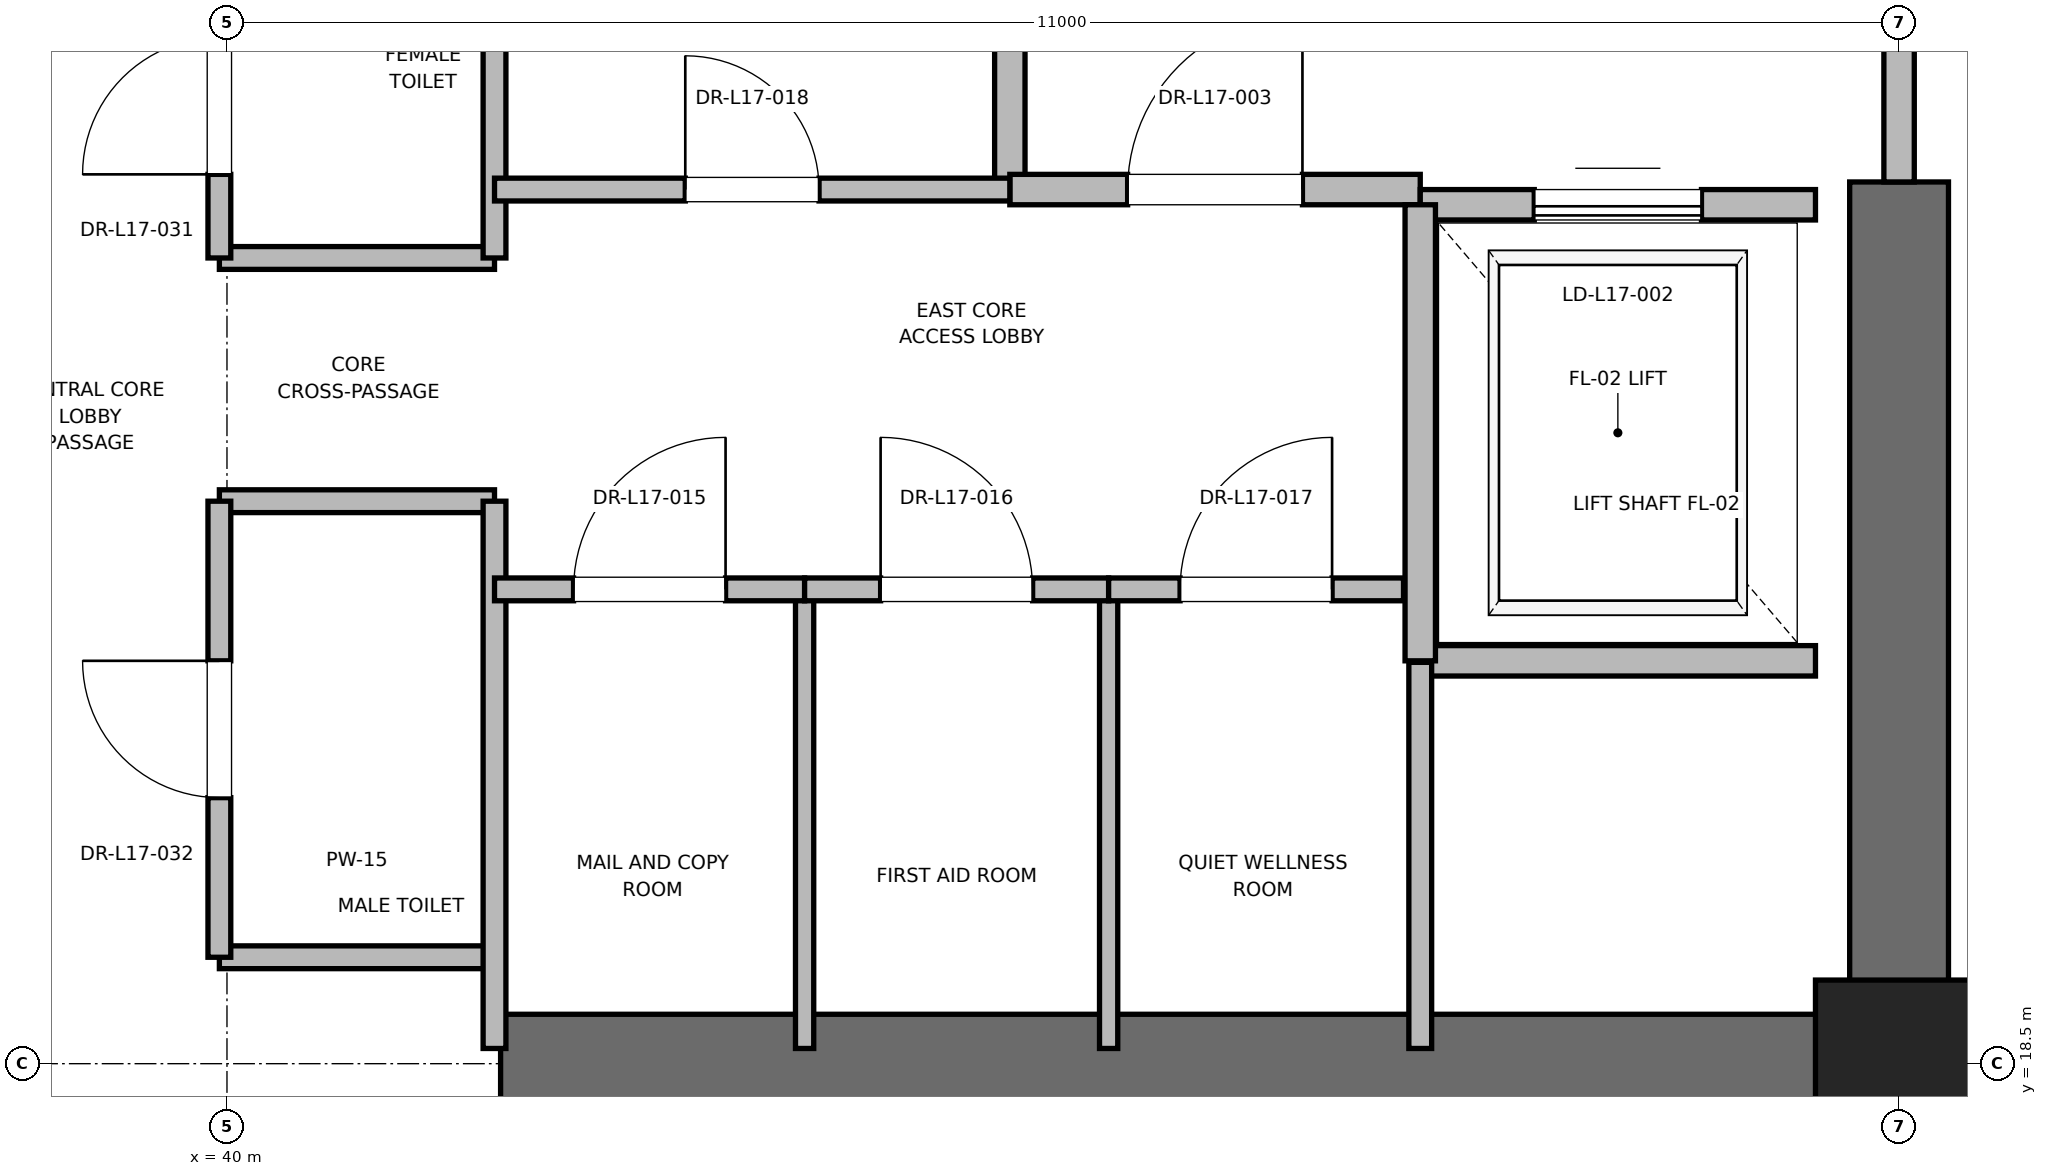
"""IFC4 building model, lengths in metres.
Left out: names, types, materials, properties, quantities, classifications, styles, units other than length and angle.
Written with IfcOpenShell. Run it as: python <this file> out.ifc"""

import sys

from ifc_helpers import new_model, si_unit, direction, frame, frame_2d, origin, origin_2d, place, context, subcontext, project, spatial, rectangle, extrude, element, fill, save


model = new_model("IFC4")
c1 = context("Model", 3, precision=1e-05, world=origin(), true_north=direction((0.0, 1.0)))
c2 = subcontext(c1, "Body", "Model", "MODEL_VIEW")
j1 = project(units=[si_unit("LENGTHUNIT", "METRE"), si_unit("PLANEANGLEUNIT", "RADIAN")], contexts=[c1])
p1 = place(None, origin())
s1 = spatial("IfcSite", under=j1, at=p1, CompositionType="ELEMENT")
p2 = place(p1, origin())
s2 = spatial("IfcBuilding", under=s1, at=p2, CompositionType="ELEMENT")
p3 = place(p2, frame((0.0, 0.0, 75.6)))
s3 = spatial("IfcBuildingStorey", under=s2, at=p3, CompositionType="ELEMENT", Elevation=75.6)
p4 = place(p3, frame((51.0, 18.5, 0.0), z_axis=(0.0, 0.0, 1.0), x_axis=(1.0, 0.0, 0.0)))
e1 = element("IfcColumn", 1, at=p4, inside=s3, PredefinedType="PILASTER", context=c2, shape_type="SweptSolid", body=[
    extrude(rectangle(XDim=1.1, YDim=1.1, at=origin_2d()), origin(), (0.0, 0.0, 1.0), 4.0),
])
p5 = place(p3, frame((41.8, 18.5, 0.0), z_axis=(0.0, 0.0, 1.0), x_axis=(1.0, 0.0, 0.0)))
e2 = element("IfcWall", 2, at=p5, inside=s3, PredefinedType="SHEAR", context=c2, shape_type="SweptSolid", body=[
    extrude(rectangle(XDim=9.2, YDim=0.65, at=frame_2d((4.6, 0.0))), origin(), (0.0, 0.0, 1.0), 3.76),
])
p6 = place(p3, frame((51.0, 18.5, 0.0), z_axis=(0.0, 0.0, 1.0), x_axis=(0.0, 1.0, 0.0)))
e3 = element("IfcWall", 3, at=p6, inside=s3, PredefinedType="SHEAR", context=c2, shape_type="SweptSolid", body=[
    extrude(rectangle(XDim=5.8, YDim=0.65, at=frame_2d((2.9, 0.0))), origin(), (0.0, 0.0, 1.0), 3.76),
])
p7 = place(p3, frame((45.15, 24.25, 0.0), z_axis=(0.0, 0.0, 1.0), x_axis=(0.0, 1.0, 0.0)))
e4 = element("IfcWall", 4, at=p7, inside=s3, PredefinedType="PARTITIONING", context=c2, shape_type="SweptSolid", body=[
    extrude(rectangle(XDim=3.37, YDim=0.2, at=frame_2d((1.685, 0.0))), origin(), (0.0, 0.0, 1.0), 3.76),
])
p8 = place(p3, frame((45.15, 24.25, 0.0), z_axis=(0.0, 0.0, 1.0), x_axis=(1.0, 0.0, 0.0)))
e5 = element("IfcWall", 5, at=p8, inside=s3, PredefinedType="PARTITIONING", context=c2, shape_type="SweptSolid", body=[
    extrude(rectangle(XDim=2.7, YDim=0.2, at=frame_2d((1.35, 0.0))), origin(), (0.0, 0.0, 1.0), 3.76),
])
p9 = place(p8, frame((0.775, 0.0, 0.0)))
e6 = element("IfcOpeningElement", 6, at=p9, cuts=e5, PredefinedType="OPENING", context=c2, shape_type="SweptSolid", body=[
    extrude(rectangle(XDim=1.15, YDim=2.2, at=frame_2d((0.575, 1.1))), frame((0.0, 0.1, 0.0), z_axis=(0.0, -1.0, 0.0), x_axis=(1.0, 0.0, 0.0)), (0.0, 0.0, 1.0), 0.2),
])
p10 = place(p3, frame((51.0, 24.3, 0.0), z_axis=(0.0, 0.0, 1.0), x_axis=(0.0, 1.0, 0.0)))
e7 = element("IfcWall", 7, at=p10, inside=s3, PredefinedType="PARTITIONING", context=c2, shape_type="SweptSolid", body=[
    extrude(rectangle(XDim=3.4, YDim=0.2, at=frame_2d((1.7, 0.0))), origin(), (0.0, 0.0, 1.0), 2.54),
])
p11 = place(p10, frame((1.125, 0.0, 0.0)))
e8 = element("IfcOpeningElement", 8, at=p11, cuts=e7, PredefinedType="OPENING", context=c2, shape_type="SweptSolid", body=[
    extrude(rectangle(XDim=1.15, YDim=2.2, at=frame_2d((0.575, 1.1))), frame((0.0, 0.1, 0.0), z_axis=(0.0, -1.0, 0.0), x_axis=(1.0, 0.0, 0.0)), (0.0, 0.0, 1.0), 0.2),
])
p12 = place(p3, frame((47.85, 21.15, 0.0), z_axis=(0.0, 0.0, 1.0), x_axis=(1.0, 0.0, 0.0)))
e9 = element("IfcWall", 9, at=p12, inside=s3, PredefinedType="SOLIDWALL", context=c2, shape_type="SweptSolid", body=[
    extrude(rectangle(XDim=2.6, YDim=0.2, at=frame_2d((1.3, 0.0))), origin(), (0.0, 0.0, 1.0), 3.76),
])
p13 = place(p3, frame((50.45, 24.15, 0.0), z_axis=(0.0, 0.0, 1.0), x_axis=(-1.0, 0.0, 0.0)))
e10 = element("IfcWall", 10, at=p13, inside=s3, PredefinedType="SOLIDWALL", context=c2, shape_type="SweptSolid", body=[
    extrude(rectangle(XDim=2.6, YDim=0.2, at=frame_2d((1.3, 0.0))), origin(), (0.0, 0.0, 1.0), 2.54),
])
p14 = place(p13, frame((0.75, 0.0, 0.0)))
e11 = element("IfcOpeningElement", 11, at=p14, cuts=e10, PredefinedType="OPENING", context=c2, shape_type="SweptSolid", body=[
    extrude(rectangle(XDim=1.1, YDim=2.2, at=frame_2d((0.55, 1.1))), frame((0.0, 0.1, 0.0), z_axis=(0.0, -1.0, 0.0), x_axis=(1.0, 0.0, 0.0)), (0.0, 0.0, 1.0), 0.2),
])
p15 = place(p3, frame((47.85, 24.15, 0.0), z_axis=(0.0, 0.0, 1.0), x_axis=(0.0, -1.0, 0.0)))
e12 = element("IfcWall", 12, at=p15, inside=s3, PredefinedType="SOLIDWALL", context=c2, shape_type="SweptSolid", body=[
    extrude(rectangle(XDim=3.0, YDim=0.2, at=frame_2d((1.5, 0.0))), origin(), (0.0, 0.0, 1.0), 3.76),
])
for number, where, z_axis, x_axis in (
    (13, (39.95, 19.2, 0.0), (0.0, 0.0, 1.0), (1.0, 0.0, 0.0)),
    (14, (39.95, 22.2, 0.0), (0.0, 0.0, 1.0), (1.0, 0.0, 0.0)),
    (15, (39.95, 23.8, 0.0), (0.0, 0.0, 1.0), (1.0, 0.0, 0.0)),
):
    element("IfcWall", number, at=place(p3, frame(where, z_axis=z_axis, x_axis=x_axis)), inside=s3, PredefinedType="PARTITIONING", context=c2, shape_type="SweptSolid", body=[
        extrude(rectangle(XDim=1.81, YDim=0.15, at=frame_2d((0.905, 0.0))), origin(), (0.0, 0.0, 1.0), 2.85),
    ])
p16 = place(p3, frame((41.76, 18.6, 0.0), z_axis=(0.0, 0.0, 1.0), x_axis=(0.0, 1.0, 0.0)))
e16 = element("IfcWall", 16, at=p16, inside=s3, PredefinedType="PARTITIONING", context=c2, shape_type="SweptSolid", body=[
    extrude(rectangle(XDim=3.6, YDim=0.15, at=frame_2d((1.8, 0.0))), origin(), (0.0, 0.0, 1.0), 2.54),
])
p17 = place(p3, frame((41.76, 23.8, 0.0), z_axis=(0.0, 0.0, 1.0), x_axis=(0.0, 1.0, 0.0)))
e17 = element("IfcWall", 17, at=p17, inside=s3, PredefinedType="PARTITIONING", context=c2, shape_type="SweptSolid", body=[
    extrude(rectangle(XDim=4.0, YDim=0.15, at=frame_2d((2.0, 0.0))), origin(), (0.0, 0.0, 1.0), 2.85),
])
p18 = place(p3, frame((39.95, 19.2, 0.0), z_axis=(0.0, 0.0, 1.0), x_axis=(0.0, 1.0, 0.0)))
e18 = element("IfcWall", 18, at=p18, inside=s3, PredefinedType="PARTITIONING", context=c2, shape_type="SweptSolid", body=[
    extrude(rectangle(XDim=3.0, YDim=0.15, at=frame_2d((1.5, 0.0))), origin(), (0.0, 0.0, 1.0), 2.85),
])
p19 = place(p18, frame((1.05, 0.0, 0.0)))
e19 = element("IfcOpeningElement", 19, at=p19, cuts=e18, PredefinedType="OPENING", context=c2, shape_type="SweptSolid", body=[
    extrude(rectangle(XDim=0.9, YDim=2.1, at=frame_2d((0.45, 1.05))), frame((0.0, 0.075, 0.0), z_axis=(0.0, -1.0, 0.0), x_axis=(1.0, 0.0, 0.0)), (0.0, 0.0, 1.0), 0.15),
])
p20 = place(p3, frame((39.95, 23.8, 0.0), z_axis=(0.0, 0.0, 1.0), x_axis=(0.0, 1.0, 0.0)))
e20 = element("IfcWall", 20, at=p20, inside=s3, PredefinedType="PARTITIONING", context=c2, shape_type="SweptSolid", body=[
    extrude(rectangle(XDim=2.0, YDim=0.15, at=frame_2d((1.0, 0.0))), origin(), (0.0, 0.0, 1.0), 2.85),
])
p21 = place(p20, frame((0.55, 0.0, 0.0)))
e21 = element("IfcOpeningElement", 21, at=p21, cuts=e20, PredefinedType="OPENING", context=c2, shape_type="SweptSolid", body=[
    extrude(rectangle(XDim=0.9, YDim=2.1, at=frame_2d((0.45, 1.05))), frame((0.0, 0.075, 0.0), z_axis=(0.0, -1.0, 0.0), x_axis=(1.0, 0.0, 0.0)), (0.0, 0.0, 1.0), 0.15),
])
p22 = place(p3, frame((47.85, 18.6, 0.0), z_axis=(0.0, 0.0, 1.0), x_axis=(0.0, 1.0, 0.0)))
e22 = element("IfcWall", 22, at=p22, inside=s3, PredefinedType="PARTITIONING", context=c2, shape_type="SweptSolid", body=[
    extrude(rectangle(XDim=2.54, YDim=0.15, at=frame_2d((1.27, 0.0))), origin(), (0.0, 0.0, 1.0), 2.85),
])
for number, where, z_axis, x_axis in (
    (23, (43.8, 18.6, 0.0), (0.0, 0.0, 1.0), (0.0, 1.0, 0.0)),
    (24, (45.8, 18.6, 0.0), (0.0, 0.0, 1.0), (0.0, 1.0, 0.0)),
):
    element("IfcWall", number, at=place(p3, frame(where, z_axis=z_axis, x_axis=x_axis)), inside=s3, PredefinedType="PARTITIONING", context=c2, shape_type="SweptSolid", body=[
        extrude(rectangle(XDim=3.02, YDim=0.12, at=frame_2d((1.51, 0.0))), origin(), (0.0, 0.0, 1.0), 2.85),
    ])
p23 = place(p3, frame((41.76, 21.62, 0.0), z_axis=(0.0, 0.0, 1.0), x_axis=(1.0, 0.0, 0.0)))
e25 = element("IfcWall", 25, at=p23, inside=s3, PredefinedType="PARTITIONING", context=c2, shape_type="SweptSolid", body=[
    extrude(rectangle(XDim=2.04, YDim=0.15, at=frame_2d((1.02, 0.0))), origin(), (0.0, 0.0, 1.0), 2.85),
])
p24 = place(p23, frame((0.52, 0.0, 0.0)))
e26 = element("IfcOpeningElement", 26, at=p24, cuts=e25, PredefinedType="OPENING", context=c2, shape_type="SweptSolid", body=[
    extrude(rectangle(XDim=1.0, YDim=2.15, at=frame_2d((0.5, 1.075))), frame((0.0, 0.075, 0.0), z_axis=(0.0, -1.0, 0.0), x_axis=(1.0, 0.0, 0.0)), (0.0, 0.0, 1.0), 0.15),
])
p25 = place(p3, frame((43.8, 21.62, 0.0), z_axis=(0.0, 0.0, 1.0), x_axis=(1.0, 0.0, 0.0)))
e27 = element("IfcWall", 27, at=p25, inside=s3, PredefinedType="PARTITIONING", context=c2, shape_type="SweptSolid", body=[
    extrude(rectangle(XDim=2.0, YDim=0.15, at=frame_2d((1.0, 0.0))), origin(), (0.0, 0.0, 1.0), 2.85),
])
p26 = place(p25, frame((0.5, 0.0, 0.0)))
e28 = element("IfcOpeningElement", 28, at=p26, cuts=e27, PredefinedType="OPENING", context=c2, shape_type="SweptSolid", body=[
    extrude(rectangle(XDim=1.0, YDim=2.15, at=frame_2d((0.5, 1.075))), frame((0.0, 0.075, 0.0), z_axis=(0.0, -1.0, 0.0), x_axis=(1.0, 0.0, 0.0)), (0.0, 0.0, 1.0), 0.15),
])
p27 = place(p3, frame((45.8, 21.62, 0.0), z_axis=(0.0, 0.0, 1.0), x_axis=(1.0, 0.0, 0.0)))
e29 = element("IfcWall", 29, at=p27, inside=s3, PredefinedType="PARTITIONING", context=c2, shape_type="SweptSolid", body=[
    extrude(rectangle(XDim=1.94, YDim=0.15, at=frame_2d((0.97, 0.0))), origin(), (0.0, 0.0, 1.0), 2.85),
])
p28 = place(p27, frame((0.47, 0.0, 0.0)))
e30 = element("IfcOpeningElement", 30, at=p28, cuts=e29, PredefinedType="OPENING", context=c2, shape_type="SweptSolid", body=[
    extrude(rectangle(XDim=1.0, YDim=2.15, at=frame_2d((0.5, 1.075))), frame((0.0, 0.075, 0.0), z_axis=(0.0, -1.0, 0.0), x_axis=(1.0, 0.0, 0.0)), (0.0, 0.0, 1.0), 0.15),
])
p29 = place(p3, frame((41.76, 24.25, 0.0), z_axis=(0.0, 0.0, 1.0), x_axis=(1.0, 0.0, 0.0)))
e31 = element("IfcWall", 31, at=p29, inside=s3, PredefinedType="PARTITIONING", context=c2, shape_type="SweptSolid", body=[
    extrude(rectangle(XDim=3.39, YDim=0.15, at=frame_2d((1.695, 0.0))), origin(), (0.0, 0.0, 1.0), 2.85),
])
p30 = place(p29, frame((1.255, 0.0, 0.0)))
e32 = element("IfcOpeningElement", 32, at=p30, cuts=e31, PredefinedType="OPENING", context=c2, shape_type="SweptSolid", body=[
    extrude(rectangle(XDim=0.88, YDim=2.1, at=frame_2d((0.44, 1.05))), frame((0.0, 0.075, 0.0), z_axis=(0.0, -1.0, 0.0), x_axis=(1.0, 0.0, 0.0)), (0.0, 0.0, 1.0), 0.15),
])
p31 = place(p9, origin())
e33 = element("IfcDoor", 33, at=p31, inside=s3, OperationType="SINGLE_SWING_RIGHT", PredefinedType="DOOR", context=c2, shape_type="SweptSolid", body=[
    extrude(rectangle(XDim=1.15, YDim=2.2, at=frame_2d((0.575, 1.1))), frame((0.0, 0.025, 0.0), z_axis=(0.0, -1.0, 0.0), x_axis=(1.0, 0.0, 0.0)), (0.0, 0.0, 1.0), 0.05),
])
fill(e6, e33)
p32 = place(p14, origin())
e34 = element("IfcDoor", 34, at=p32, inside=s3, OperationType="SLIDING_TO_RIGHT", PredefinedType="DOOR", context=c2, shape_type="SweptSolid", body=[
    extrude(rectangle(XDim=1.1, YDim=2.2, at=frame_2d((0.55, 1.1))), frame((0.0, 0.025, 0.0), z_axis=(0.0, -1.0, 0.0), x_axis=(1.0, 0.0, 0.0)), (0.0, 0.0, 1.0), 0.05),
])
fill(e11, e34)
p33 = place(p19, origin())
e35 = element("IfcDoor", 35, at=p33, inside=s3, OperationType="SINGLE_SWING_RIGHT", PredefinedType="DOOR", context=c2, shape_type="SweptSolid", body=[
    extrude(rectangle(XDim=0.9, YDim=2.1, at=frame_2d((0.45, 1.05))), frame((0.0, 0.025, 0.0), z_axis=(0.0, -1.0, 0.0), x_axis=(1.0, 0.0, 0.0)), (0.0, 0.0, 1.0), 0.05),
])
fill(e19, e35)
p34 = place(p21, origin())
e36 = element("IfcDoor", 36, at=p34, inside=s3, OperationType="SINGLE_SWING_LEFT", PredefinedType="DOOR", context=c2, shape_type="SweptSolid", body=[
    extrude(rectangle(XDim=0.9, YDim=2.1, at=frame_2d((0.45, 1.05))), frame((0.0, 0.025, 0.0), z_axis=(0.0, -1.0, 0.0), x_axis=(1.0, 0.0, 0.0)), (0.0, 0.0, 1.0), 0.05),
])
fill(e21, e36)
p35 = place(p24, origin())
e37 = element("IfcDoor", 37, at=p35, inside=s3, OperationType="SINGLE_SWING_RIGHT", PredefinedType="DOOR", context=c2, shape_type="SweptSolid", body=[
    extrude(rectangle(XDim=1.0, YDim=2.15, at=frame_2d((0.5, 1.075))), frame((0.0, 0.025, 0.0), z_axis=(0.0, -1.0, 0.0), x_axis=(1.0, 0.0, 0.0)), (0.0, 0.0, 1.0), 0.05),
])
fill(e26, e37)
p36 = place(p26, origin())
e38 = element("IfcDoor", 38, at=p36, inside=s3, OperationType="SINGLE_SWING_LEFT", PredefinedType="DOOR", context=c2, shape_type="SweptSolid", body=[
    extrude(rectangle(XDim=1.0, YDim=2.15, at=frame_2d((0.5, 1.075))), frame((0.0, 0.025, 0.0), z_axis=(0.0, -1.0, 0.0), x_axis=(1.0, 0.0, 0.0)), (0.0, 0.0, 1.0), 0.05),
])
fill(e28, e38)
p37 = place(p28, origin())
e39 = element("IfcDoor", 39, at=p37, inside=s3, OperationType="SINGLE_SWING_RIGHT", PredefinedType="DOOR", context=c2, shape_type="SweptSolid", body=[
    extrude(rectangle(XDim=1.0, YDim=2.15, at=frame_2d((0.5, 1.075))), frame((0.0, 0.025, 0.0), z_axis=(0.0, -1.0, 0.0), x_axis=(1.0, 0.0, 0.0)), (0.0, 0.0, 1.0), 0.05),
])
fill(e30, e39)
p38 = place(p30, origin())
e40 = element("IfcDoor", 40, at=p38, inside=s3, OperationType="SINGLE_SWING_LEFT", PredefinedType="DOOR", context=c2, shape_type="SweptSolid", body=[
    extrude(rectangle(XDim=0.88, YDim=2.1, at=frame_2d((0.44, 1.05))), frame((0.0, 0.025, 0.0), z_axis=(0.0, -1.0, 0.0), x_axis=(1.0, 0.0, 0.0)), (0.0, 0.0, 1.0), 0.05),
])
fill(e32, e40)
save(model, sys.argv[1])
